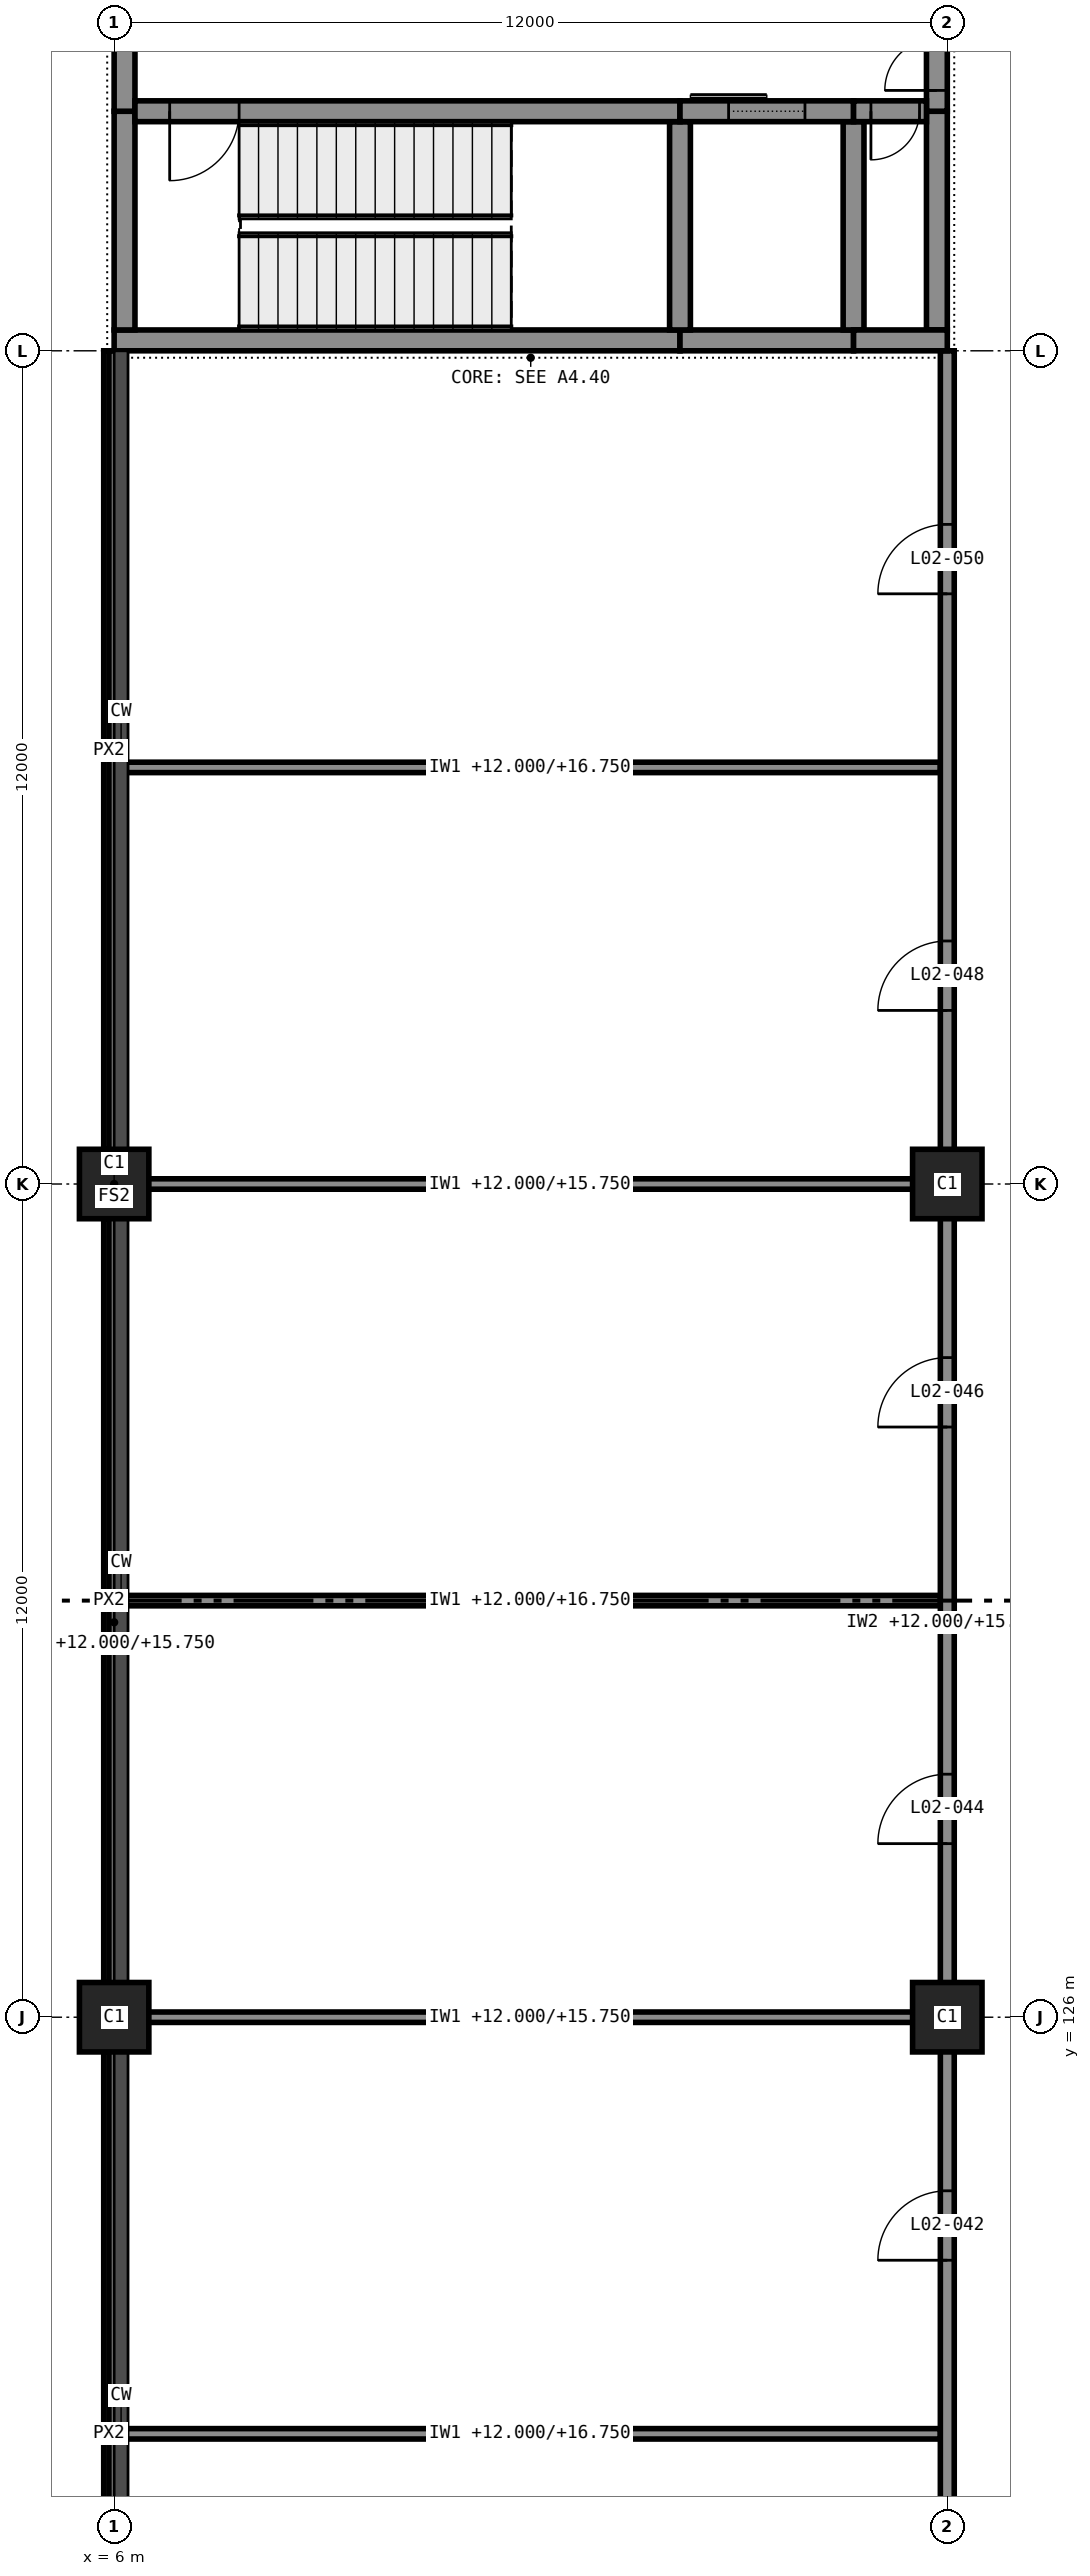
"""IFC4 building model, lengths in metres.
Left out: names, types, materials, properties, quantities, classifications, styles, units other than length and angle.
Written with IfcOpenShell. Run it as: python <this file> out.ifc"""

import sys

from ifc_helpers import new_model, si_unit, direction, frame, frame_2d, origin, origin_2d, place, context, subcontext, project, spatial, rectangle, extrude, element, fill, save


model = new_model("IFC4")
c1 = context("Model", 3, precision=1e-05, world=origin(), true_north=direction((0.0, 1.0)))
c2 = subcontext(c1, "Body", "Model", "MODEL_VIEW")
j1 = project(units=[si_unit("LENGTHUNIT", "METRE"), si_unit("PLANEANGLEUNIT", "RADIAN")], contexts=[c1])
p1 = place(None, origin())
s1 = spatial("IfcSite", under=j1, at=p1, CompositionType="ELEMENT")
p2 = place(p1, origin())
s2 = spatial("IfcBuilding", under=s1, at=p2, CompositionType="ELEMENT")
p3 = place(p2, frame((0.0, 0.0, 12.0)))
s3 = spatial("IfcBuildingStorey", under=s2, at=p3, CompositionType="ELEMENT", Elevation=12.0)
for number, where, z_axis, x_axis in (
    (1, (6.0, 126.0, 0.0), (0.0, 0.0, 1.0), (1.0, 0.0, 0.0)),
    (2, (6.0, 138.0, 0.0), (0.0, 0.0, 1.0), (1.0, 0.0, 0.0)),
    (3, (18.0, 126.0, 0.0), (0.0, 0.0, 1.0), (1.0, 0.0, 0.0)),
    (4, (18.0, 138.0, 0.0), (0.0, 0.0, 1.0), (1.0, 0.0, 0.0)),
):
    element("IfcColumn", number, at=place(p3, frame(where, z_axis=z_axis, x_axis=x_axis)), inside=s3, PredefinedType="COLUMN", context=c2, shape_type="SweptSolid", body=[
        extrude(rectangle(XDim=1.0, YDim=1.0, at=origin_2d()), origin(), (0.0, 0.0, 1.0), 5.0),
    ])
p4 = place(p3, frame((6.0, 150.15, 0.0), z_axis=(0.0, 0.0, 1.0), x_axis=(1.0, 0.0, 0.0)))
e5 = element("IfcWall", 5, at=p4, inside=s3, PredefinedType="SHEAR", context=c2, shape_type="SweptSolid", body=[
    extrude(rectangle(XDim=8.15, YDim=0.3, at=frame_2d((4.075, 0.0))), origin(), (0.0, 0.0, 1.0), 4.75),
])
p5 = place(p3, frame((14.15, 150.15, 0.0), z_axis=(0.0, 0.0, 1.0), x_axis=(1.0, 0.0, 0.0)))
e6 = element("IfcWall", 6, at=p5, inside=s3, PredefinedType="SHEAR", context=c2, shape_type="SweptSolid", body=[
    extrude(rectangle(XDim=2.5, YDim=0.3, at=frame_2d((1.25, 0.0))), origin(), (0.0, 0.0, 1.0), 4.75),
])
p6 = place(p3, frame((16.65, 150.15, 0.0), z_axis=(0.0, 0.0, 1.0), x_axis=(1.0, 0.0, 0.0)))
e7 = element("IfcWall", 7, at=p6, inside=s3, PredefinedType="SHEAR", context=c2, shape_type="SweptSolid", body=[
    extrude(rectangle(XDim=1.35, YDim=0.3, at=frame_2d((0.675, 0.0))), origin(), (0.0, 0.0, 1.0), 4.75),
])
p7 = place(p3, frame((6.3, 153.45, 0.0), z_axis=(0.0, 0.0, 1.0), x_axis=(1.0, 0.0, 0.0)))
e8 = element("IfcWall", 8, at=p7, inside=s3, PredefinedType="SHEAR", context=c2, shape_type="SweptSolid", body=[
    extrude(rectangle(XDim=7.85, YDim=0.3, at=frame_2d((3.925, 0.0))), origin(), (0.0, 0.0, 1.0), 4.75),
])
p8 = place(p7, frame((0.5, 0.0, 0.0)))
e9 = element("IfcOpeningElement", 9, at=p8, cuts=e8, PredefinedType="OPENING", context=c2, shape_type="SweptSolid", body=[
    extrude(rectangle(XDim=1.0, YDim=2.1, at=frame_2d((0.5, 1.05))), frame((0.0, 0.16, 0.0), z_axis=(0.0, -1.0, 0.0), x_axis=(1.0, 0.0, 0.0)), (0.0, 0.0, 1.0), 0.32),
])
p9 = place(p3, frame((14.15, 153.45, 0.0), z_axis=(0.0, 0.0, 1.0), x_axis=(1.0, 0.0, 0.0)))
e10 = element("IfcWall", 10, at=p9, inside=s3, PredefinedType="SHEAR", context=c2, shape_type="SweptSolid", body=[
    extrude(rectangle(XDim=2.5, YDim=0.3, at=frame_2d((1.25, 0.0))), origin(), (0.0, 0.0, 1.0), 4.75),
])
p10 = place(p9, frame((0.7, 0.0, 0.0)))
e11 = element("IfcOpeningElement", 11, at=p10, cuts=e10, PredefinedType="OPENING", context=c2, shape_type="SweptSolid", body=[
    extrude(rectangle(XDim=1.1, YDim=2.1, at=frame_2d((0.55, 1.05))), frame((0.0, 0.16, 0.0), z_axis=(0.0, -1.0, 0.0), x_axis=(1.0, 0.0, 0.0)), (0.0, 0.0, 1.0), 0.32),
])
p11 = place(p3, frame((16.65, 153.45, 0.0), z_axis=(0.0, 0.0, 1.0), x_axis=(1.0, 0.0, 0.0)))
e12 = element("IfcWall", 12, at=p11, inside=s3, PredefinedType="SHEAR", context=c2, shape_type="SweptSolid", body=[
    extrude(rectangle(XDim=1.05, YDim=0.3, at=frame_2d((0.525, 0.0))), origin(), (0.0, 0.0, 1.0), 4.75),
])
p12 = place(p11, frame((0.25, 0.0, 0.0)))
e13 = element("IfcOpeningElement", 13, at=p12, cuts=e12, PredefinedType="OPENING", context=c2, shape_type="SweptSolid", body=[
    extrude(rectangle(XDim=0.7, YDim=2.1, at=frame_2d((0.35, 1.05))), frame((0.0, 0.16, 0.0), z_axis=(0.0, -1.0, 0.0), x_axis=(1.0, 0.0, 0.0)), (0.0, 0.0, 1.0), 0.32),
])
p13 = place(p3, frame((6.15, 150.3, 0.0), z_axis=(0.0, 0.0, 1.0), x_axis=(0.0, 1.0, 0.0)))
e14 = element("IfcWall", 14, at=p13, inside=s3, PredefinedType="SHEAR", context=c2, shape_type="SweptSolid", body=[
    extrude(rectangle(XDim=3.15, YDim=0.3, at=frame_2d((1.575, 0.0))), origin(), (0.0, 0.0, 1.0), 4.75),
])
p14 = place(p3, frame((6.15, 153.45, 0.0), z_axis=(0.0, 0.0, 1.0), x_axis=(0.0, 1.0, 0.0)))
e15 = element("IfcWall", 15, at=p14, inside=s3, PredefinedType="SHEAR", context=c2, shape_type="SweptSolid", body=[
    extrude(rectangle(XDim=5.1, YDim=0.3, at=frame_2d((2.55, 0.0))), origin(), (0.0, 0.0, 1.0), 4.75),
])
p15 = place(p3, frame((17.85, 150.3, 0.0), z_axis=(0.0, 0.0, 1.0), x_axis=(0.0, 1.0, 0.0)))
e16 = element("IfcWall", 16, at=p15, inside=s3, PredefinedType="SHEAR", context=c2, shape_type="SweptSolid", body=[
    extrude(rectangle(XDim=3.15, YDim=0.3, at=frame_2d((1.575, 0.0))), origin(), (0.0, 0.0, 1.0), 4.75),
])
p16 = place(p3, frame((17.85, 153.45, 0.0), z_axis=(0.0, 0.0, 1.0), x_axis=(0.0, 1.0, 0.0)))
e17 = element("IfcWall", 17, at=p16, inside=s3, PredefinedType="SHEAR", context=c2, shape_type="SweptSolid", body=[
    extrude(rectangle(XDim=5.1, YDim=0.3, at=frame_2d((2.55, 0.0))), origin(), (0.0, 0.0, 1.0), 4.75),
])
p17 = place(p16, frame((0.3, 0.0, 0.0)))
e18 = element("IfcOpeningElement", 18, at=p17, cuts=e17, PredefinedType="OPENING", context=c2, shape_type="SweptSolid", body=[
    extrude(rectangle(XDim=1.5, YDim=2.1, at=frame_2d((0.75, 1.05))), frame((0.0, 0.16, 0.0), z_axis=(0.0, -1.0, 0.0), x_axis=(1.0, 0.0, 0.0)), (0.0, 0.0, 1.0), 0.32),
])
for number, where, z_axis, x_axis in (
    (19, (14.15, 150.3, 0.0), (0.0, 0.0, 1.0), (0.0, 1.0, 0.0)),
    (20, (16.65, 150.3, 0.0), (0.0, 0.0, 1.0), (0.0, 1.0, 0.0)),
):
    element("IfcWall", number, at=place(p3, frame(where, z_axis=z_axis, x_axis=x_axis)), inside=s3, PredefinedType="SHEAR", context=c2, shape_type="SweptSolid", body=[
        extrude(rectangle(XDim=3.0, YDim=0.3, at=frame_2d((1.5, 0.0))), origin(), (0.0, 0.0, 1.0), 4.75),
    ])
p18 = place(p3, frame((5.925, 150.0, 4.75), z_axis=(0.0, 0.0, 1.0), x_axis=(0.0, -1.0, 0.0)))
e21 = element("IfcWall", 21, at=p18, inside=s3, PredefinedType="STANDARD", context=c2, shape_type="SweptSolid", body=[
    extrude(rectangle(XDim=11.5, YDim=0.15, at=frame_2d((5.75, 0.0))), origin(), (0.0, 0.0, 1.0), 0.25),
])
for number, where, z_axis, x_axis in (
    (22, (5.925, 137.5, 4.75), (0.0, 0.0, 1.0), (0.0, -1.0, 0.0)),
    (23, (5.925, 125.5, 4.75), (0.0, 0.0, 1.0), (0.0, -1.0, 0.0)),
):
    element("IfcWall", number, at=place(p3, frame(where, z_axis=z_axis, x_axis=x_axis)), inside=s3, PredefinedType="STANDARD", context=c2, shape_type="SweptSolid", body=[
        extrude(rectangle(XDim=11.0, YDim=0.15, at=frame_2d((5.5, 0.0))), origin(), (0.0, 0.0, 1.0), 0.25),
    ])
p19 = place(p3, frame((6.075, 120.0, 0.0), z_axis=(0.0, 0.0, 1.0), x_axis=(1.0, 0.0, 0.0)))
e24 = element("IfcWall", 24, at=p19, inside=s3, PredefinedType="PARTITIONING", context=c2, shape_type="SweptSolid", body=[
    extrude(rectangle(XDim=11.825, YDim=0.15, at=frame_2d((5.913, 0.0))), origin(), (0.0, 0.0, 1.0), 4.75),
])
p20 = place(p3, frame((6.075, 126.0, 0.0), z_axis=(0.0, 0.0, 1.0), x_axis=(1.0, 0.0, 0.0)))
e25 = element("IfcWall", 25, at=p20, inside=s3, PredefinedType="PARTITIONING", context=c2, shape_type="SweptSolid", body=[
    extrude(rectangle(XDim=11.825, YDim=0.15, at=frame_2d((5.913, 0.0))), origin(), (0.0, 0.0, 1.0), 3.75),
])
p21 = place(p3, frame((6.075, 132.0, 0.0), z_axis=(0.0, 0.0, 1.0), x_axis=(1.0, 0.0, 0.0)))
e26 = element("IfcWall", 26, at=p21, inside=s3, PredefinedType="PARTITIONING", context=c2, shape_type="SweptSolid", body=[
    extrude(rectangle(XDim=11.825, YDim=0.15, at=frame_2d((5.913, 0.0))), origin(), (0.0, 0.0, 1.0), 4.75),
])
p22 = place(p3, frame((6.075, 138.0, 0.0), z_axis=(0.0, 0.0, 1.0), x_axis=(1.0, 0.0, 0.0)))
e27 = element("IfcWall", 27, at=p22, inside=s3, PredefinedType="PARTITIONING", context=c2, shape_type="SweptSolid", body=[
    extrude(rectangle(XDim=11.825, YDim=0.15, at=frame_2d((5.913, 0.0))), origin(), (0.0, 0.0, 1.0), 3.75),
])
p23 = place(p3, frame((6.075, 144.0, 0.0), z_axis=(0.0, 0.0, 1.0), x_axis=(1.0, 0.0, 0.0)))
e28 = element("IfcWall", 28, at=p23, inside=s3, PredefinedType="PARTITIONING", context=c2, shape_type="SweptSolid", body=[
    extrude(rectangle(XDim=11.825, YDim=0.15, at=frame_2d((5.913, 0.0))), origin(), (0.0, 0.0, 1.0), 4.75),
])
p24 = place(p3, frame((6.0, 102.0, 0.0), z_axis=(0.0, 0.0, 1.0), x_axis=(0.0, 1.0, 0.0)))
e29 = element("IfcWall", 29, at=p24, inside=s3, PredefinedType="PARTITIONING", context=c2, shape_type="SweptSolid", body=[
    extrude(rectangle(XDim=48.0, YDim=0.15, at=frame_2d((24.0, 0.0))), origin(), (0.0, 0.0, 1.0), 3.75),
])
p25 = place(p3, frame((18.0, 102.0, 0.0), z_axis=(0.0, 0.0, 1.0), x_axis=(0.0, 1.0, 0.0)))
e30 = element("IfcWall", 30, at=p25, inside=s3, PredefinedType="PARTITIONING", context=c2, shape_type="SweptSolid", body=[
    extrude(rectangle(XDim=48.0, YDim=0.2, at=frame_2d((24.0, 0.0))), origin(), (0.0, 0.0, 1.0), 3.75),
])
p26 = place(p25, frame((2.5, 0.0, 0.0)))
e31 = element("IfcOpeningElement", 31, at=p26, cuts=e30, PredefinedType="OPENING", context=c2, shape_type="SweptSolid", body=[
    extrude(rectangle(XDim=1.0, YDim=2.1, at=frame_2d((0.5, 1.05))), frame((0.0, 0.11, 0.0), z_axis=(0.0, -1.0, 0.0), x_axis=(1.0, 0.0, 0.0)), (0.0, 0.0, 1.0), 0.22),
])
p27 = place(p25, frame((8.5, 0.0, 0.0)))
e32 = element("IfcOpeningElement", 32, at=p27, cuts=e30, PredefinedType="OPENING", context=c2, shape_type="SweptSolid", body=[
    extrude(rectangle(XDim=1.0, YDim=2.1, at=frame_2d((0.5, 1.05))), frame((0.0, 0.11, 0.0), z_axis=(0.0, -1.0, 0.0), x_axis=(1.0, 0.0, 0.0)), (0.0, 0.0, 1.0), 0.22),
])
p28 = place(p25, frame((14.5, 0.0, 0.0)))
e33 = element("IfcOpeningElement", 33, at=p28, cuts=e30, PredefinedType="OPENING", context=c2, shape_type="SweptSolid", body=[
    extrude(rectangle(XDim=1.0, YDim=2.1, at=frame_2d((0.5, 1.05))), frame((0.0, 0.11, 0.0), z_axis=(0.0, -1.0, 0.0), x_axis=(1.0, 0.0, 0.0)), (0.0, 0.0, 1.0), 0.22),
])
p29 = place(p25, frame((20.5, 0.0, 0.0)))
e34 = element("IfcOpeningElement", 34, at=p29, cuts=e30, PredefinedType="OPENING", context=c2, shape_type="SweptSolid", body=[
    extrude(rectangle(XDim=1.0, YDim=2.1, at=frame_2d((0.5, 1.05))), frame((0.0, 0.11, 0.0), z_axis=(0.0, -1.0, 0.0), x_axis=(1.0, 0.0, 0.0)), (0.0, 0.0, 1.0), 0.22),
])
p30 = place(p25, frame((26.5, 0.0, 0.0)))
e35 = element("IfcOpeningElement", 35, at=p30, cuts=e30, PredefinedType="OPENING", context=c2, shape_type="SweptSolid", body=[
    extrude(rectangle(XDim=1.0, YDim=2.1, at=frame_2d((0.5, 1.05))), frame((0.0, 0.11, 0.0), z_axis=(0.0, -1.0, 0.0), x_axis=(1.0, 0.0, 0.0)), (0.0, 0.0, 1.0), 0.22),
])
p31 = place(p25, frame((32.5, 0.0, 0.0)))
e36 = element("IfcOpeningElement", 36, at=p31, cuts=e30, PredefinedType="OPENING", context=c2, shape_type="SweptSolid", body=[
    extrude(rectangle(XDim=1.0, YDim=2.1, at=frame_2d((0.5, 1.05))), frame((0.0, 0.11, 0.0), z_axis=(0.0, -1.0, 0.0), x_axis=(1.0, 0.0, 0.0)), (0.0, 0.0, 1.0), 0.22),
])
p32 = place(p25, frame((38.5, 0.0, 0.0)))
e37 = element("IfcOpeningElement", 37, at=p32, cuts=e30, PredefinedType="OPENING", context=c2, shape_type="SweptSolid", body=[
    extrude(rectangle(XDim=1.0, YDim=2.1, at=frame_2d((0.5, 1.05))), frame((0.0, 0.11, 0.0), z_axis=(0.0, -1.0, 0.0), x_axis=(1.0, 0.0, 0.0)), (0.0, 0.0, 1.0), 0.22),
])
p33 = place(p25, frame((44.5, 0.0, 0.0)))
e38 = element("IfcOpeningElement", 38, at=p33, cuts=e30, PredefinedType="OPENING", context=c2, shape_type="SweptSolid", body=[
    extrude(rectangle(XDim=1.0, YDim=2.1, at=frame_2d((0.5, 1.05))), frame((0.0, 0.11, 0.0), z_axis=(0.0, -1.0, 0.0), x_axis=(1.0, 0.0, 0.0)), (0.0, 0.0, 1.0), 0.22),
])
p34 = place(p29, origin())
e39 = element("IfcDoor", 39, at=p34, inside=s3, OperationType="SINGLE_SWING_RIGHT", PredefinedType="DOOR", context=c2, shape_type="SweptSolid", body=[
    extrude(rectangle(XDim=1.0, YDim=2.1, at=frame_2d((0.5, 1.05))), frame((0.0, 0.025, 0.0), z_axis=(0.0, -1.0, 0.0), x_axis=(1.0, 0.0, 0.0)), (0.0, 0.0, 1.0), 0.05),
])
fill(e34, e39)
p35 = place(p30, origin())
e40 = element("IfcDoor", 40, at=p35, inside=s3, OperationType="SINGLE_SWING_RIGHT", PredefinedType="DOOR", context=c2, shape_type="SweptSolid", body=[
    extrude(rectangle(XDim=1.0, YDim=2.1, at=frame_2d((0.5, 1.05))), frame((0.0, 0.025, 0.0), z_axis=(0.0, -1.0, 0.0), x_axis=(1.0, 0.0, 0.0)), (0.0, 0.0, 1.0), 0.05),
])
fill(e35, e40)
p36 = place(p31, origin())
e41 = element("IfcDoor", 41, at=p36, inside=s3, OperationType="SINGLE_SWING_RIGHT", PredefinedType="DOOR", context=c2, shape_type="SweptSolid", body=[
    extrude(rectangle(XDim=1.0, YDim=2.1, at=frame_2d((0.5, 1.05))), frame((0.0, 0.025, 0.0), z_axis=(0.0, -1.0, 0.0), x_axis=(1.0, 0.0, 0.0)), (0.0, 0.0, 1.0), 0.05),
])
fill(e36, e41)
p37 = place(p32, origin())
e42 = element("IfcDoor", 42, at=p37, inside=s3, OperationType="SINGLE_SWING_RIGHT", PredefinedType="DOOR", context=c2, shape_type="SweptSolid", body=[
    extrude(rectangle(XDim=1.0, YDim=2.1, at=frame_2d((0.5, 1.05))), frame((0.0, 0.025, 0.0), z_axis=(0.0, -1.0, 0.0), x_axis=(1.0, 0.0, 0.0)), (0.0, 0.0, 1.0), 0.05),
])
fill(e37, e42)
p38 = place(p33, origin())
e43 = element("IfcDoor", 43, at=p38, inside=s3, OperationType="SINGLE_SWING_RIGHT", PredefinedType="DOOR", context=c2, shape_type="SweptSolid", body=[
    extrude(rectangle(XDim=1.0, YDim=2.1, at=frame_2d((0.5, 1.05))), frame((0.0, 0.025, 0.0), z_axis=(0.0, -1.0, 0.0), x_axis=(1.0, 0.0, 0.0)), (0.0, 0.0, 1.0), 0.05),
])
fill(e38, e43)
p39 = place(p8, frame((1.0, 0.0, 0.0), z_axis=(0.0, 0.0, 1.0), x_axis=(-1.0, 0.0, 0.0)))
e44 = element("IfcDoor", 44, at=p39, inside=s3, OperationType="SINGLE_SWING_LEFT", PredefinedType="DOOR", context=c2, shape_type="SweptSolid", body=[
    extrude(rectangle(XDim=1.0, YDim=2.1, at=frame_2d((0.5, 1.05))), frame((0.0, 0.025, 0.0), z_axis=(0.0, -1.0, 0.0), x_axis=(1.0, 0.0, 0.0)), (0.0, 0.0, 1.0), 0.05),
])
fill(e9, e44)
p40 = place(p10, origin())
e45 = element("IfcDoor", 45, at=p40, inside=s3, OperationType="SLIDING_TO_LEFT", PredefinedType="DOOR", context=c2, shape_type="SweptSolid", body=[
    extrude(rectangle(XDim=1.1, YDim=2.1, at=frame_2d((0.55, 1.05))), frame((0.0, 0.025, 0.0), z_axis=(0.0, -1.0, 0.0), x_axis=(1.0, 0.0, 0.0)), (0.0, 0.0, 1.0), 0.05),
])
fill(e11, e45)
p41 = place(p12, frame((0.7, 0.0, 0.0), z_axis=(0.0, 0.0, 1.0), x_axis=(-1.0, 0.0, 0.0)))
e46 = element("IfcDoor", 46, at=p41, inside=s3, OperationType="SINGLE_SWING_LEFT", PredefinedType="DOOR", context=c2, shape_type="SweptSolid", body=[
    extrude(rectangle(XDim=0.7, YDim=2.1, at=frame_2d((0.35, 1.05))), frame((0.0, 0.025, 0.0), z_axis=(0.0, -1.0, 0.0), x_axis=(1.0, 0.0, 0.0)), (0.0, 0.0, 1.0), 0.05),
])
fill(e13, e46)
p42 = place(p17, origin())
e47 = element("IfcDoor", 47, at=p42, inside=s3, OperationType="DOUBLE_DOOR_SINGLE_SWING", PredefinedType="DOOR", context=c2, shape_type="SweptSolid", body=[
    extrude(rectangle(XDim=1.5, YDim=2.1, at=frame_2d((0.75, 1.05))), frame((0.0, 0.025, 0.0), z_axis=(0.0, -1.0, 0.0), x_axis=(1.0, 0.0, 0.0)), (0.0, 0.0, 1.0), 0.05),
])
fill(e18, e47)
save(model, sys.argv[1])
